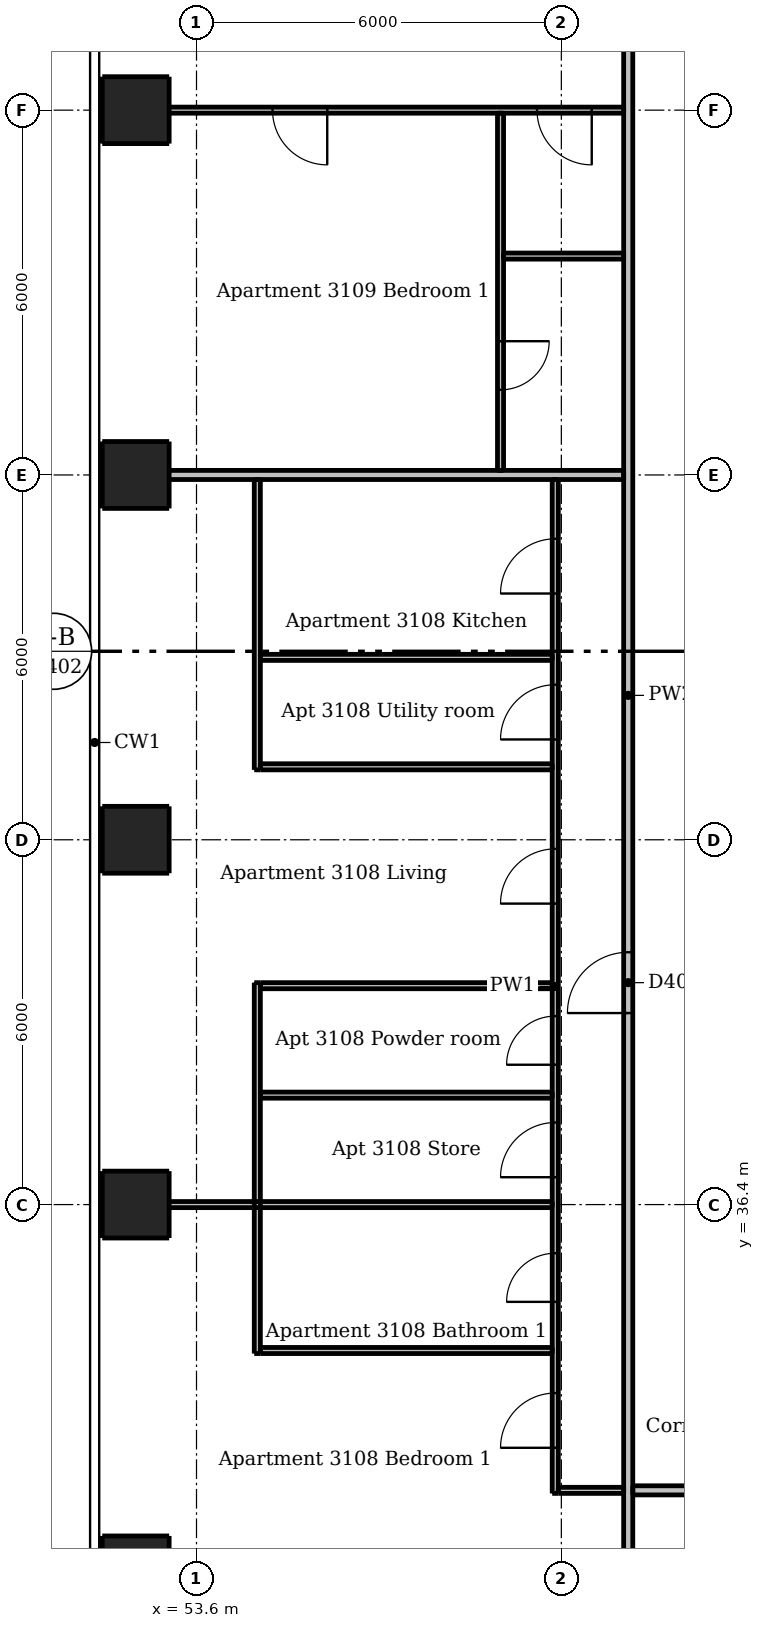
"""IFC4 building model, lengths in metres.
Left out: names, types, materials, properties, quantities, classifications, styles, units other than length and angle.
Written with IfcOpenShell. Run it as: python <this file> out.ifc"""

import sys

from ifc_helpers import new_model, si_unit, direction, frame, frame_2d, origin, origin_2d, place, context, subcontext, project, spatial, rectangle, extrude, element, fill, save


model = new_model("IFC4")
c1 = context("Model", 3, precision=1e-05, world=origin(), true_north=direction((0.0, 1.0)))
c2 = subcontext(c1, "Body", "Model", "MODEL_VIEW")
j1 = project(units=[si_unit("LENGTHUNIT", "METRE"), si_unit("PLANEANGLEUNIT", "RADIAN")], contexts=[c1])
p1 = place(None, origin())
s1 = spatial("IfcSite", under=j1, at=p1, CompositionType="ELEMENT")
p2 = place(p1, origin())
s2 = spatial("IfcBuilding", under=s1, at=p2, CompositionType="ELEMENT")
p3 = place(p2, frame((0.0, 0.0, 115.0)))
s3 = spatial("IfcBuildingStorey", under=s2, at=p3, CompositionType="ELEMENT", Elevation=115.0)
for number, where, z_axis, x_axis in (
    (1, (52.6, 30.4, 0.0), (0.0, 0.0, 1.0), (1.0, 0.0, 0.0)),
    (2, (52.6, 36.4, 0.0), (0.0, 0.0, 1.0), (1.0, 0.0, 0.0)),
    (3, (52.6, 42.4, 0.0), (0.0, 0.0, 1.0), (1.0, 0.0, 0.0)),
    (4, (52.6, 48.4, 0.0), (0.0, 0.0, 1.0), (1.0, 0.0, 0.0)),
    (5, (52.6, 54.4, 0.0), (0.0, 0.0, 1.0), (1.0, 0.0, 0.0)),
):
    element("IfcColumn", number, at=place(p3, frame(where, z_axis=z_axis, x_axis=x_axis)), inside=s3, PredefinedType="COLUMN", context=c2, shape_type="SweptSolid", body=[
        extrude(rectangle(XDim=1.1, YDim=1.1, at=origin_2d()), origin(), (0.0, 0.0, 1.0), 3.05),
    ])
p4 = place(p3, frame((54.6, 33.95, 0.0), z_axis=(0.0, 0.0, 1.0), x_axis=(0.0, 1.0, 0.0)))
e6 = element("IfcWall", 6, at=p4, inside=s3, PredefinedType="PARTITIONING", context=c2, shape_type="SweptSolid", body=[
    extrude(rectangle(XDim=6.1, YDim=0.1, at=frame_2d((3.05, 0.0))), origin(), (0.0, 0.0, 1.0), 3.05),
])
p5 = place(p3, frame((54.6, 43.55, 0.0), z_axis=(0.0, 0.0, 1.0), x_axis=(0.0, 1.0, 0.0)))
e7 = element("IfcWall", 7, at=p5, inside=s3, PredefinedType="PARTITIONING", context=c2, shape_type="SweptSolid", body=[
    extrude(rectangle(XDim=4.775, YDim=0.1, at=frame_2d((2.387, 0.0))), origin(), (0.0, 0.0, 1.0), 3.05),
])
p6 = place(p3, frame((58.6, 54.35, 0.0), z_axis=(0.0, 0.0, 1.0), x_axis=(0.0, -1.0, 0.0)))
e8 = element("IfcWall", 8, at=p6, inside=s3, PredefinedType="PARTITIONING", context=c2, shape_type="SweptSolid", body=[
    extrude(rectangle(XDim=5.875, YDim=0.1, at=frame_2d((2.938, 0.0))), origin(), (0.0, 0.0, 1.0), 3.05),
])
p7 = place(p6, frame((3.75, 0.0, 0.0)))
e9 = element("IfcOpeningElement", 9, at=p7, cuts=e8, PredefinedType="OPENING", context=c2, shape_type="SweptSolid", body=[
    extrude(rectangle(XDim=0.8, YDim=2.1, at=frame_2d((0.4, 1.05))), frame((0.0, 0.06, 0.0), z_axis=(0.0, -1.0, 0.0), x_axis=(1.0, 0.0, 0.0)), (0.0, 0.0, 1.0), 0.12),
])
p8 = place(p3, frame((59.5, 31.65, 0.0), z_axis=(0.0, 0.0, 1.0), x_axis=(0.0, 1.0, 0.0)))
e10 = element("IfcWall", 10, at=p8, inside=s3, PredefinedType="PARTITIONING", context=c2, shape_type="SweptSolid", body=[
    extrude(rectangle(XDim=16.675, YDim=0.1, at=frame_2d((8.337, 0.0))), origin(), (0.0, 0.0, 1.0), 2.51),
])
p9 = place(p8, frame((9.7, 0.0, 0.0)))
e11 = element("IfcOpeningElement", 11, at=p9, cuts=e10, PredefinedType="OPENING", context=c2, shape_type="SweptSolid", body=[
    extrude(rectangle(XDim=0.9, YDim=2.1, at=frame_2d((0.45, 1.05))), frame((0.0, 0.06, 0.0), z_axis=(0.0, -1.0, 0.0), x_axis=(1.0, 0.0, 0.0)), (0.0, 0.0, 1.0), 0.12),
])
p10 = place(p8, frame((14.8, 0.0, 0.0)))
e12 = element("IfcOpeningElement", 12, at=p10, cuts=e10, PredefinedType="OPENING", context=c2, shape_type="SweptSolid", body=[
    extrude(rectangle(XDim=0.9, YDim=2.1, at=frame_2d((0.45, 1.05))), frame((0.0, 0.06, 0.0), z_axis=(0.0, -1.0, 0.0), x_axis=(1.0, 0.0, 0.0)), (0.0, 0.0, 1.0), 0.12),
])
p11 = place(p8, frame((12.4, 0.0, 0.0)))
e13 = element("IfcOpeningElement", 13, at=p11, cuts=e10, PredefinedType="OPENING", context=c2, shape_type="SweptSolid", body=[
    extrude(rectangle(XDim=0.9, YDim=2.1, at=frame_2d((0.45, 1.05))), frame((0.0, 0.06, 0.0), z_axis=(0.0, -1.0, 0.0), x_axis=(1.0, 0.0, 0.0)), (0.0, 0.0, 1.0), 0.12),
])
p12 = place(p8, frame((5.2, 0.0, 0.0)))
e14 = element("IfcOpeningElement", 14, at=p12, cuts=e10, PredefinedType="OPENING", context=c2, shape_type="SweptSolid", body=[
    extrude(rectangle(XDim=0.9, YDim=2.1, at=frame_2d((0.45, 1.05))), frame((0.0, 0.06, 0.0), z_axis=(0.0, -1.0, 0.0), x_axis=(1.0, 0.0, 0.0)), (0.0, 0.0, 1.0), 0.12),
])
p13 = place(p8, frame((7.05, 0.0, 0.0)))
e15 = element("IfcOpeningElement", 15, at=p13, cuts=e10, PredefinedType="OPENING", context=c2, shape_type="SweptSolid", body=[
    extrude(rectangle(XDim=0.8, YDim=2.1, at=frame_2d((0.4, 1.05))), frame((0.0, 0.06, 0.0), z_axis=(0.0, -1.0, 0.0), x_axis=(1.0, 0.0, 0.0)), (0.0, 0.0, 1.0), 0.12),
])
p14 = place(p8, frame((0.75, 0.0, 0.0)))
e16 = element("IfcOpeningElement", 16, at=p14, cuts=e10, PredefinedType="OPENING", context=c2, shape_type="SweptSolid", body=[
    extrude(rectangle(XDim=0.9, YDim=2.1, at=frame_2d((0.45, 1.05))), frame((0.0, 0.06, 0.0), z_axis=(0.0, -1.0, 0.0), x_axis=(1.0, 0.0, 0.0)), (0.0, 0.0, 1.0), 0.12),
])
p15 = place(p8, frame((3.15, 0.0, 0.0)))
e17 = element("IfcOpeningElement", 17, at=p15, cuts=e10, PredefinedType="OPENING", context=c2, shape_type="SweptSolid", body=[
    extrude(rectangle(XDim=0.8, YDim=2.1, at=frame_2d((0.4, 1.05))), frame((0.0, 0.06, 0.0), z_axis=(0.0, -1.0, 0.0), x_axis=(1.0, 0.0, 0.0)), (0.0, 0.0, 1.0), 0.12),
])
p16 = place(p3, frame((60.625, 54.4, 0.0), z_axis=(0.0, 0.0, 1.0), x_axis=(-1.0, 0.0, 0.0)))
e18 = element("IfcWall", 18, at=p16, inside=s3, PredefinedType="PARTITIONING", context=c2, shape_type="SweptSolid", body=[
    extrude(rectangle(XDim=8.625, YDim=0.1, at=frame_2d((4.312, 0.0))), origin(), (0.0, 0.0, 1.0), 2.516),
])
p17 = place(p16, frame((0.525, 0.0, 0.0)))
e19 = element("IfcOpeningElement", 19, at=p17, cuts=e18, PredefinedType="OPENING", context=c2, shape_type="SweptSolid", body=[
    extrude(rectangle(XDim=0.9, YDim=2.1, at=frame_2d((0.45, 1.05))), frame((0.0, 0.06, 0.0), z_axis=(0.0, -1.0, 0.0), x_axis=(1.0, 0.0, 0.0)), (0.0, 0.0, 1.0), 0.12),
])
p18 = place(p16, frame((4.875, 0.0, 0.0)))
e20 = element("IfcOpeningElement", 20, at=p18, cuts=e18, PredefinedType="OPENING", context=c2, shape_type="SweptSolid", body=[
    extrude(rectangle(XDim=0.9, YDim=2.1, at=frame_2d((0.45, 1.05))), frame((0.0, 0.06, 0.0), z_axis=(0.0, -1.0, 0.0), x_axis=(1.0, 0.0, 0.0)), (0.0, 0.0, 1.0), 0.12),
])
p19 = place(p3, frame((58.65, 52.0, 0.0), z_axis=(0.0, 0.0, 1.0), x_axis=(1.0, 0.0, 0.0)))
e21 = element("IfcWall", 21, at=p19, inside=s3, PredefinedType="PARTITIONING", context=c2, shape_type="SweptSolid", body=[
    extrude(rectangle(XDim=1.975, YDim=0.1, at=frame_2d((0.988, 0.0))), origin(), (0.0, 0.0, 1.0), 3.05),
])
for number, where, z_axis, x_axis in (
    (22, (54.65, 45.4, 0.0), (0.0, 0.0, 1.0), (1.0, 0.0, 0.0)),
    (23, (54.65, 43.6, 0.0), (0.0, 0.0, 1.0), (1.0, 0.0, 0.0)),
    (24, (54.65, 40.0, 0.0), (0.0, 0.0, 1.0), (1.0, 0.0, 0.0)),
    (25, (54.65, 38.2, 0.0), (0.0, 0.0, 1.0), (1.0, 0.0, 0.0)),
):
    element("IfcWall", number, at=place(p3, frame(where, z_axis=z_axis, x_axis=x_axis)), inside=s3, PredefinedType="PARTITIONING", context=c2, shape_type="SweptSolid", body=[
        extrude(rectangle(XDim=4.8, YDim=0.1, at=frame_2d((2.4, 0.0))), origin(), (0.0, 0.0, 1.0), 3.05),
    ])
p20 = place(p3, frame((52.0, 36.4, 0.0), z_axis=(0.0, 0.0, 1.0), x_axis=(1.0, 0.0, 0.0)))
e26 = element("IfcWall", 26, at=p20, inside=s3, PredefinedType="PARTITIONING", context=c2, shape_type="SweptSolid", body=[
    extrude(rectangle(XDim=7.45, YDim=0.1, at=frame_2d((3.725, 0.0))), origin(), (0.0, 0.0, 1.0), 2.516),
])
p21 = place(p3, frame((54.65, 34.0, 0.0), z_axis=(0.0, 0.0, 1.0), x_axis=(1.0, 0.0, 0.0)))
e27 = element("IfcWall", 27, at=p21, inside=s3, PredefinedType="PARTITIONING", context=c2, shape_type="SweptSolid", body=[
    extrude(rectangle(XDim=4.8, YDim=0.1, at=frame_2d((2.4, 0.0))), origin(), (0.0, 0.0, 1.0), 3.05),
])
p22 = place(p3, frame((59.55, 31.7, 0.0), z_axis=(0.0, 0.0, 1.0), x_axis=(1.0, 0.0, 0.0)))
e28 = element("IfcWall", 28, at=p22, inside=s3, PredefinedType="PARTITIONING", context=c2, shape_type="SweptSolid", body=[
    extrude(rectangle(XDim=1.075, YDim=0.1, at=frame_2d((0.538, 0.0))), origin(), (0.0, 0.0, 1.0), 3.05),
])
p23 = place(p3, frame((60.7, 30.325, 0.0), z_axis=(0.0, 0.0, 1.0), x_axis=(0.0, 1.0, 0.0)))
e29 = element("IfcWall", 29, at=p23, inside=s3, PredefinedType="PARTITIONING", context=c2, shape_type="SweptSolid", body=[
    extrude(rectangle(XDim=28.9, YDim=0.15, at=frame_2d((14.45, 0.0))), origin(), (0.0, 0.0, 1.0), 3.05),
])
p24 = place(p23, frame((9.225, 0.0, 0.0)))
e30 = element("IfcOpeningElement", 30, at=p24, cuts=e29, PredefinedType="OPENING", context=c2, shape_type="SweptSolid", body=[
    extrude(rectangle(XDim=1.0, YDim=2.1, at=frame_2d((0.5, 1.05))), frame((0.0, 0.085, 0.0), z_axis=(0.0, -1.0, 0.0), x_axis=(1.0, 0.0, 0.0)), (0.0, 0.0, 1.0), 0.17),
])
p25 = place(p23, frame((26.025, 0.0, 0.0)))
e31 = element("IfcOpeningElement", 31, at=p25, cuts=e29, PredefinedType="OPENING", context=c2, shape_type="SweptSolid", body=[
    extrude(rectangle(XDim=1.0, YDim=2.1, at=frame_2d((0.5, 1.05))), frame((0.0, 0.085, 0.0), z_axis=(0.0, -1.0, 0.0), x_axis=(1.0, 0.0, 0.0)), (0.0, 0.0, 1.0), 0.17),
])
p26 = place(p3, frame((52.0, 48.4, 0.0), z_axis=(0.0, 0.0, 1.0), x_axis=(1.0, 0.0, 0.0)))
e32 = element("IfcWall", 32, at=p26, inside=s3, PredefinedType="PARTITIONING", context=c2, shape_type="SweptSolid", body=[
    extrude(rectangle(XDim=8.625, YDim=0.15, at=frame_2d((4.312, 0.0))), origin(), (0.0, 0.0, 1.0), 2.516),
])
p27 = place(p3, frame((89.525, 31.7, 0.0), z_axis=(0.0, 0.0, 1.0), x_axis=(-1.0, 0.0, 0.0)))
e33 = element("IfcWall", 33, at=p27, inside=s3, PredefinedType="PARTITIONING", context=c2, shape_type="SweptSolid", body=[
    extrude(rectangle(XDim=28.75, YDim=0.15, at=frame_2d((14.375, 0.0))), origin(), (0.0, 0.0, 1.0), 3.05),
])
p28 = place(p27, frame((24.625, 0.0, 0.0)))
e34 = element("IfcOpeningElement", 34, at=p28, cuts=e33, PredefinedType="OPENING", context=c2, shape_type="SweptSolid", body=[
    extrude(rectangle(XDim=1.0, YDim=2.1, at=frame_2d((0.5, 1.05))), frame((0.0, 0.085, 0.0), z_axis=(0.0, -1.0, 0.0), x_axis=(1.0, 0.0, 0.0)), (0.0, 0.0, 1.0), 0.17),
])
p29 = place(p27, frame((5.425, 0.0, 0.0)))
e35 = element("IfcOpeningElement", 35, at=p29, cuts=e33, PredefinedType="OPENING", context=c2, shape_type="SweptSolid", body=[
    extrude(rectangle(XDim=1.0, YDim=2.1, at=frame_2d((0.5, 1.05))), frame((0.0, 0.085, 0.0), z_axis=(0.0, -1.0, 0.0), x_axis=(1.0, 0.0, 0.0)), (0.0, 0.0, 1.0), 0.17),
])
p30 = place(p24, origin())
e36 = element("IfcDoor", 36, at=p30, inside=s3, OperationType="SINGLE_SWING_LEFT", PredefinedType="DOOR", context=c2, shape_type="SweptSolid", body=[
    extrude(rectangle(XDim=1.0, YDim=2.1, at=frame_2d((0.5, 1.05))), frame((0.0, 0.025, 0.0), z_axis=(0.0, -1.0, 0.0), x_axis=(1.0, 0.0, 0.0)), (0.0, 0.0, 1.0), 0.05),
])
fill(e30, e36)
p31 = place(p9, origin())
e37 = element("IfcDoor", 37, at=p31, inside=s3, OperationType="SINGLE_SWING_LEFT", PredefinedType="DOOR", context=c2, shape_type="SweptSolid", body=[
    extrude(rectangle(XDim=0.9, YDim=2.1, at=frame_2d((0.45, 1.05))), frame((0.0, 0.025, 0.0), z_axis=(0.0, -1.0, 0.0), x_axis=(1.0, 0.0, 0.0)), (0.0, 0.0, 1.0), 0.05),
])
fill(e11, e37)
p32 = place(p10, origin())
e38 = element("IfcDoor", 38, at=p32, inside=s3, OperationType="SINGLE_SWING_LEFT", PredefinedType="DOOR", context=c2, shape_type="SweptSolid", body=[
    extrude(rectangle(XDim=0.9, YDim=2.1, at=frame_2d((0.45, 1.05))), frame((0.0, 0.025, 0.0), z_axis=(0.0, -1.0, 0.0), x_axis=(1.0, 0.0, 0.0)), (0.0, 0.0, 1.0), 0.05),
])
fill(e12, e38)
p33 = place(p11, origin())
e39 = element("IfcDoor", 39, at=p33, inside=s3, OperationType="SINGLE_SWING_LEFT", PredefinedType="DOOR", context=c2, shape_type="SweptSolid", body=[
    extrude(rectangle(XDim=0.9, YDim=2.1, at=frame_2d((0.45, 1.05))), frame((0.0, 0.025, 0.0), z_axis=(0.0, -1.0, 0.0), x_axis=(1.0, 0.0, 0.0)), (0.0, 0.0, 1.0), 0.05),
])
fill(e13, e39)
p34 = place(p12, origin())
e40 = element("IfcDoor", 40, at=p34, inside=s3, OperationType="SINGLE_SWING_LEFT", PredefinedType="DOOR", context=c2, shape_type="SweptSolid", body=[
    extrude(rectangle(XDim=0.9, YDim=2.1, at=frame_2d((0.45, 1.05))), frame((0.0, 0.025, 0.0), z_axis=(0.0, -1.0, 0.0), x_axis=(1.0, 0.0, 0.0)), (0.0, 0.0, 1.0), 0.05),
])
fill(e14, e40)
p35 = place(p13, origin())
e41 = element("IfcDoor", 41, at=p35, inside=s3, OperationType="SINGLE_SWING_LEFT", PredefinedType="DOOR", context=c2, shape_type="SweptSolid", body=[
    extrude(rectangle(XDim=0.8, YDim=2.1, at=frame_2d((0.4, 1.05))), frame((0.0, 0.025, 0.0), z_axis=(0.0, -1.0, 0.0), x_axis=(1.0, 0.0, 0.0)), (0.0, 0.0, 1.0), 0.05),
])
fill(e15, e41)
p36 = place(p14, origin())
e42 = element("IfcDoor", 42, at=p36, inside=s3, OperationType="SINGLE_SWING_LEFT", PredefinedType="DOOR", context=c2, shape_type="SweptSolid", body=[
    extrude(rectangle(XDim=0.9, YDim=2.1, at=frame_2d((0.45, 1.05))), frame((0.0, 0.025, 0.0), z_axis=(0.0, -1.0, 0.0), x_axis=(1.0, 0.0, 0.0)), (0.0, 0.0, 1.0), 0.05),
])
fill(e16, e42)
p37 = place(p15, origin())
e43 = element("IfcDoor", 43, at=p37, inside=s3, OperationType="SINGLE_SWING_LEFT", PredefinedType="DOOR", context=c2, shape_type="SweptSolid", body=[
    extrude(rectangle(XDim=0.8, YDim=2.1, at=frame_2d((0.4, 1.05))), frame((0.0, 0.025, 0.0), z_axis=(0.0, -1.0, 0.0), x_axis=(1.0, 0.0, 0.0)), (0.0, 0.0, 1.0), 0.05),
])
fill(e17, e43)
p38 = place(p17, origin())
e44 = element("IfcDoor", 44, at=p38, inside=s3, OperationType="SINGLE_SWING_LEFT", PredefinedType="DOOR", context=c2, shape_type="SweptSolid", body=[
    extrude(rectangle(XDim=0.9, YDim=2.1, at=frame_2d((0.45, 1.05))), frame((0.0, 0.025, 0.0), z_axis=(0.0, -1.0, 0.0), x_axis=(1.0, 0.0, 0.0)), (0.0, 0.0, 1.0), 0.05),
])
fill(e19, e44)
p39 = place(p18, origin())
e45 = element("IfcDoor", 45, at=p39, inside=s3, OperationType="SINGLE_SWING_LEFT", PredefinedType="DOOR", context=c2, shape_type="SweptSolid", body=[
    extrude(rectangle(XDim=0.9, YDim=2.1, at=frame_2d((0.45, 1.05))), frame((0.0, 0.025, 0.0), z_axis=(0.0, -1.0, 0.0), x_axis=(1.0, 0.0, 0.0)), (0.0, 0.0, 1.0), 0.05),
])
fill(e20, e45)
p40 = place(p7, origin())
e46 = element("IfcDoor", 46, at=p40, inside=s3, OperationType="SINGLE_SWING_LEFT", PredefinedType="DOOR", context=c2, shape_type="SweptSolid", body=[
    extrude(rectangle(XDim=0.8, YDim=2.1, at=frame_2d((0.4, 1.05))), frame((0.0, 0.025, 0.0), z_axis=(0.0, -1.0, 0.0), x_axis=(1.0, 0.0, 0.0)), (0.0, 0.0, 1.0), 0.05),
])
fill(e9, e46)
save(model, sys.argv[1])
